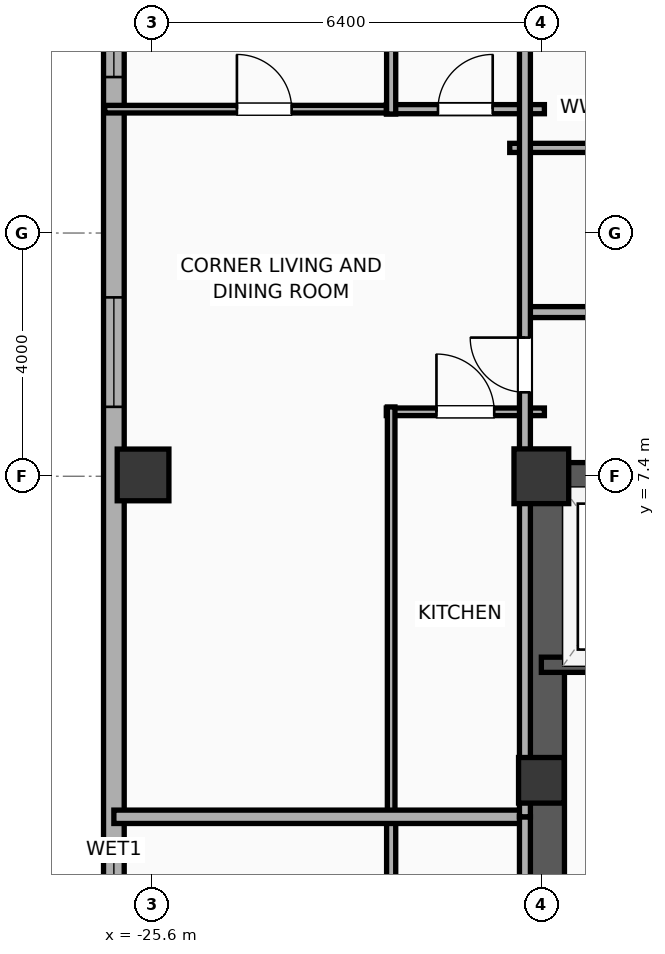
"""IFC4 building model, lengths in metres.
Left out: names, types, materials, properties, quantities, classifications, styles, units other than length and angle.
Written with IfcOpenShell. Run it as: python <this file> out.ifc"""

import sys

from ifc_helpers import new_model, si_unit, direction, frame, frame_2d, origin, origin_2d, place, context, subcontext, project, spatial, rectangle, hollow_rectangle, extrude, element, fill, save


model = new_model("IFC4")
c1 = context("Model", 3, precision=1e-05, world=origin(), true_north=direction((0.0, 1.0)))
c2 = subcontext(c1, "Body", "Model", "MODEL_VIEW")
j1 = project(units=[si_unit("LENGTHUNIT", "METRE"), si_unit("PLANEANGLEUNIT", "RADIAN")], contexts=[c1])
p1 = place(None, origin())
s1 = spatial("IfcSite", under=j1, at=p1, CompositionType="ELEMENT")
p2 = place(p1, origin())
s2 = spatial("IfcBuilding", under=s1, at=p2, CompositionType="ELEMENT")
p3 = place(p2, frame((0.0, 0.0, 200.2)))
s3 = spatial("IfcBuildingStorey", under=s2, at=p3, CompositionType="ELEMENT", Elevation=200.2)
p4 = place(p3, frame((-19.2, 2.4, 0.0), z_axis=(0.0, 0.0, 1.0), x_axis=(1.0, 0.0, 0.0)))
e1 = element("IfcColumn", 1, at=p4, inside=s3, PredefinedType="COLUMN", context=c2, shape_type="SweptSolid", body=[
    extrude(rectangle(XDim=0.75, YDim=0.75, at=origin_2d()), origin(), (0.0, 0.0, 1.0), 3.9),
])
p5 = place(p3, frame((-19.2, 7.4, 0.0), z_axis=(0.0, 0.0, 1.0), x_axis=(1.0, 0.0, 0.0)))
e2 = element("IfcColumn", 2, at=p5, inside=s3, PredefinedType="COLUMN", context=c2, shape_type="SweptSolid", body=[
    extrude(rectangle(XDim=0.9, YDim=0.9, at=origin_2d()), origin(), (0.0, 0.0, 1.0), 3.9),
])
p6 = place(p3, frame((-19.425, 7.4, 0.0), z_axis=(0.0, 0.0, 1.0), x_axis=(1.0, 0.0, 0.0)))
e3 = element("IfcWall", 3, at=p6, inside=s3, PredefinedType="SHEAR", context=c2, shape_type="SweptSolid", body=[
    extrude(rectangle(XDim=7.25, YDim=0.45, at=frame_2d((3.625, 0.0))), origin(), (0.0, 0.0, 1.0), 3.65),
])
p7 = place(p3, frame((-19.145, -7.4, 0.0), z_axis=(0.0, 0.0, 1.0), x_axis=(0.0, 1.0, 0.0)))
e4 = element("IfcWall", 4, at=p7, inside=s3, PredefinedType="SHEAR", context=c2, shape_type="SweptSolid", body=[
    extrude(rectangle(XDim=14.8, YDim=0.65, at=frame_2d((7.4, 0.0))), origin(), (0.0, 0.0, 1.0), 3.65),
])
p8 = place(p3, frame((-25.75, 7.422, 0.0), z_axis=(0.0, 0.0, 1.0), x_axis=(1.0, 0.0, 0.0)))
e5 = element("IfcColumn", 5, at=p8, inside=s3, PredefinedType="COLUMN", context=c2, shape_type="SweptSolid", body=[
    extrude(hollow_rectangle(XDim=0.85, YDim=0.85, WallThickness=0.028, at=origin_2d()), origin(), (0.0, 0.0, 1.0), 3.9),
])
p9 = place(p3, frame((-26.23, -15.383, 0.0), z_axis=(0.0, 0.0, 1.0), x_axis=(0.0, 1.0, 0.0)))
e6 = element("IfcWall", 6, at=p9, inside=s3, PredefinedType="ELEMENTEDWALL", context=c2, shape_type="SweptSolid", body=[
    extrude(rectangle(XDim=31.967, YDim=0.34, at=frame_2d((15.983, 0.0))), origin(), (0.0, 0.0, 1.0), 2.54),
])
p10 = place(p9, frame((6.242, 0.0, 0.75)))
e7 = element("IfcOpeningElement", 7, at=p10, cuts=e6, PredefinedType="OPENING", context=c2, shape_type="SweptSolid", body=[
    extrude(rectangle(XDim=1.8, YDim=1.63, at=frame_2d((0.9, 0.815))), frame((0.0, 0.18, 0.0), z_axis=(0.0, -1.0, 0.0), x_axis=(1.0, 0.0, 0.0)), (0.0, 0.0, 1.0), 0.36),
])
p11 = place(p9, frame((23.925, 0.0, 0.75)))
e8 = element("IfcOpeningElement", 8, at=p11, cuts=e6, PredefinedType="OPENING", context=c2, shape_type="SweptSolid", body=[
    extrude(rectangle(XDim=1.8, YDim=1.63, at=frame_2d((0.9, 0.815))), frame((0.0, 0.18, 0.0), z_axis=(0.0, -1.0, 0.0), x_axis=(1.0, 0.0, 0.0)), (0.0, 0.0, 1.0), 0.36),
])
p12 = place(p9, frame((13.253, 0.0, 0.75)))
e9 = element("IfcOpeningElement", 9, at=p12, cuts=e6, PredefinedType="OPENING", context=c2, shape_type="SweptSolid", body=[
    extrude(rectangle(XDim=1.2, YDim=1.63, at=frame_2d((0.6, 0.815))), frame((0.0, 0.18, 0.0), z_axis=(0.0, -1.0, 0.0), x_axis=(1.0, 0.0, 0.0)), (0.0, 0.0, 1.0), 0.36),
])
p13 = place(p9, frame((29.348, 0.0, 0.75)))
e10 = element("IfcOpeningElement", 10, at=p13, cuts=e6, PredefinedType="OPENING", context=c2, shape_type="SweptSolid", body=[
    extrude(rectangle(XDim=1.2, YDim=1.63, at=frame_2d((0.6, 0.815))), frame((0.0, 0.18, 0.0), z_axis=(0.0, -1.0, 0.0), x_axis=(1.0, 0.0, 0.0)), (0.0, 0.0, 1.0), 0.36),
])
p14 = place(p3, frame((-19.2, 4.3, 0.0), z_axis=(0.0, 0.0, 1.0), x_axis=(1.0, 0.0, 0.0)))
e11 = element("IfcWall", 11, at=p14, inside=s3, PredefinedType="SOLIDWALL", context=c2, shape_type="SweptSolid", body=[
    extrude(rectangle(XDim=2.6, YDim=0.25, at=frame_2d((1.3, 0.0))), origin(), (0.0, 0.0, 1.0), 3.65),
])
p15 = place(p3, frame((-19.72, 12.8, 0.0), z_axis=(0.0, 0.0, 1.0), x_axis=(1.0, 0.0, 0.0)))
e12 = element("IfcWall", 12, at=p15, inside=s3, PredefinedType="PLUMBINGWALL", context=c2, shape_type="SweptSolid", body=[
    extrude(rectangle(XDim=2.679, YDim=0.15, at=frame_2d((1.339, 0.0))), origin(), (0.0, 0.0, 1.0), 3.65),
])
p16 = place(p3, frame((-19.5, 10.1, 0.0), z_axis=(0.0, 0.0, 1.0), x_axis=(1.0, 0.0, 0.0)))
e13 = element("IfcWall", 13, at=p16, inside=s3, PredefinedType="PARTITIONING", context=c2, shape_type="SweptSolid", body=[
    extrude(rectangle(XDim=11.42, YDim=0.18, at=frame_2d((5.71, 0.0))), origin(), (0.0, 0.0, 1.0), 3.65),
])
p17 = place(p16, frame((3.464, 0.0, 0.0)))
e14 = element("IfcOpeningElement", 14, at=p17, cuts=e13, PredefinedType="OPENING", context=c2, shape_type="SweptSolid", body=[
    extrude(rectangle(XDim=1.15, YDim=2.05, at=frame_2d((0.575, 1.025))), frame((0.0, 0.1, 0.0), z_axis=(0.0, -1.0, 0.0), x_axis=(1.0, 0.0, 0.0)), (0.0, 0.0, 1.0), 0.2),
])
p18 = place(p16, frame((8.323, 0.0, 0.0)))
e15 = element("IfcOpeningElement", 15, at=p18, cuts=e13, PredefinedType="OPENING", context=c2, shape_type="SweptSolid", body=[
    extrude(rectangle(XDim=0.9, YDim=2.05, at=frame_2d((0.45, 1.025))), frame((0.0, 0.1, 0.0), z_axis=(0.0, -1.0, 0.0), x_axis=(1.0, 0.0, 0.0)), (0.0, 0.0, 1.0), 0.2),
])
p19 = place(p3, frame((-21.67, -4.94, 0.0), z_axis=(0.0, 0.0, 1.0), x_axis=(0.0, 1.0, 0.0)))
e16 = element("IfcWall", 16, at=p19, inside=s3, PredefinedType="PLUMBINGWALL", context=c2, shape_type="SweptSolid", body=[
    extrude(rectangle(XDim=6.72, YDim=0.15, at=frame_2d((3.36, 0.0))), origin(), (0.0, 0.0, 1.0), 3.65),
])
p20 = place(p3, frame((-26.38, 13.437, 0.0), z_axis=(0.0, 0.0, 1.0), x_axis=(1.0, 0.0, 0.0)))
e17 = element("IfcWall", 17, at=p20, inside=s3, PredefinedType="PARTITIONING", context=c2, shape_type="SweptSolid", body=[
    extrude(rectangle(XDim=4.77, YDim=0.125, at=frame_2d((2.385, 0.0))), origin(), (0.0, 0.0, 1.0), 3.65),
])
p21 = place(p20, frame((2.174, 0.0, 0.0)))
e18 = element("IfcOpeningElement", 18, at=p21, cuts=e17, PredefinedType="OPENING", context=c2, shape_type="SweptSolid", body=[
    extrude(rectangle(XDim=0.9, YDim=2.05, at=frame_2d((0.45, 1.025))), frame((0.0, 0.073, 0.0), z_axis=(0.0, -1.0, 0.0), x_axis=(1.0, 0.0, 0.0)), (0.0, 0.0, 1.0), 0.145),
])
p22 = place(p3, frame((-21.75, 8.46, 0.0), z_axis=(0.0, 0.0, 1.0), x_axis=(1.0, 0.0, 0.0)))
e19 = element("IfcWall", 19, at=p22, inside=s3, PredefinedType="PARTITIONING", context=c2, shape_type="SweptSolid", body=[
    extrude(rectangle(XDim=2.6, YDim=0.125, at=frame_2d((1.3, 0.0))), origin(), (0.0, 0.0, 1.0), 3.65),
])
p23 = place(p22, frame((0.825, 0.0, 0.0)))
e20 = element("IfcOpeningElement", 20, at=p23, cuts=e19, PredefinedType="OPENING", context=c2, shape_type="SweptSolid", body=[
    extrude(rectangle(XDim=0.95, YDim=2.05, at=frame_2d((0.475, 1.025))), frame((0.0, 0.073, 0.0), z_axis=(0.0, -1.0, 0.0), x_axis=(1.0, 0.0, 0.0)), (0.0, 0.0, 1.0), 0.145),
])
p24 = place(p3, frame((-21.75, 13.437, 0.0), z_axis=(0.0, 0.0, 1.0), x_axis=(1.0, 0.0, 0.0)))
e21 = element("IfcWall", 21, at=p24, inside=s3, PredefinedType="PLUMBINGWALL", context=c2, shape_type="SweptSolid", body=[
    extrude(rectangle(XDim=2.6, YDim=0.15, at=frame_2d((1.3, 0.0))), origin(), (0.0, 0.0, 1.0), 3.65),
])
p25 = place(p24, frame((0.85, 0.0, 0.0)))
e22 = element("IfcOpeningElement", 22, at=p25, cuts=e21, PredefinedType="OPENING", context=c2, shape_type="SweptSolid", body=[
    extrude(rectangle(XDim=0.9, YDim=2.05, at=frame_2d((0.45, 1.025))), frame((0.0, 0.085, 0.0), z_axis=(0.0, -1.0, 0.0), x_axis=(1.0, 0.0, 0.0)), (0.0, 0.0, 1.0), 0.17),
])
p26 = place(p3, frame((-21.67, 1.82, 0.0), z_axis=(0.0, 0.0, 1.0), x_axis=(0.0, 1.0, 0.0)))
e23 = element("IfcWall", 23, at=p26, inside=s3, PredefinedType="PARTITIONING", context=c2, shape_type="SweptSolid", body=[
    extrude(rectangle(XDim=6.72, YDim=0.125, at=frame_2d((3.36, 0.0))), origin(), (0.0, 0.0, 1.0), 3.65),
])
p27 = place(p3, frame((-21.67, 13.357, 0.0), z_axis=(0.0, 0.0, 1.0), x_axis=(0.0, 1.0, 0.0)))
e24 = element("IfcWall", 24, at=p27, inside=s3, PredefinedType="PLUMBINGWALL", context=c2, shape_type="SweptSolid", body=[
    extrude(rectangle(XDim=6.72, YDim=0.15, at=frame_2d((3.36, 0.0))), origin(), (0.0, 0.0, 1.0), 2.54),
])
p28 = place(p3, frame((-19.47, 1.8, 0.0), z_axis=(0.0, 0.0, 1.0), x_axis=(-1.0, 0.0, 0.0)))
e25 = element("IfcWall", 25, at=p28, inside=s3, PredefinedType="PARTITIONING", context=c2, shape_type="SweptSolid", body=[
    extrude(rectangle(XDim=6.76, YDim=0.22, at=frame_2d((3.38, 0.0))), origin(), (0.0, 0.0, 1.0), 3.65),
])
p29 = place(p3, frame((-19.47, -18.83, 0.0), z_axis=(0.0, 0.0, 1.0), x_axis=(0.0, 1.0, 0.0)))
e26 = element("IfcWall", 26, at=p29, inside=s3, PredefinedType="PARTITIONING", context=c2, shape_type="SweptSolid", body=[
    extrude(rectangle(XDim=20.63, YDim=0.18, at=frame_2d((10.315, 0.0))), origin(), (0.0, 0.0, 1.0), 2.54),
])
p30 = place(p29, frame((9.149, 0.0, 0.0)))
e27 = element("IfcOpeningElement", 27, at=p30, cuts=e26, PredefinedType="OPENING", context=c2, shape_type="SweptSolid", body=[
    extrude(rectangle(XDim=0.9, YDim=2.05, at=frame_2d((0.45, 1.025))), frame((0.0, 0.1, 0.0), z_axis=(0.0, -1.0, 0.0), x_axis=(1.0, 0.0, 0.0)), (0.0, 0.0, 1.0), 0.2),
])
p31 = place(p3, frame((-19.47, 1.8, 0.0), z_axis=(0.0, 0.0, 1.0), x_axis=(0.0, 1.0, 0.0)))
e28 = element("IfcWall", 28, at=p31, inside=s3, PredefinedType="PARTITIONING", context=c2, shape_type="SweptSolid", body=[
    extrude(rectangle(XDim=18.23, YDim=0.18, at=frame_2d((9.115, 0.0))), origin(), (0.0, 0.0, 1.0), 2.54),
])
p32 = place(p31, frame((6.98, 0.0, 0.0)))
e29 = element("IfcOpeningElement", 29, at=p32, cuts=e28, PredefinedType="OPENING", context=c2, shape_type="SweptSolid", body=[
    extrude(rectangle(XDim=0.9, YDim=2.05, at=frame_2d((0.45, 1.025))), frame((0.0, 0.1, 0.0), z_axis=(0.0, -1.0, 0.0), x_axis=(1.0, 0.0, 0.0)), (0.0, 0.0, 1.0), 0.2),
])
p33 = place(p11, origin())
e30 = element("IfcWindow", 30, at=p33, inside=s3, PartitioningType="SINGLE_PANEL", PredefinedType="WINDOW", context=c2, shape_type="SweptSolid", body=[
    extrude(rectangle(XDim=1.8, YDim=1.63, at=frame_2d((0.9, 0.815))), frame((0.0, 0.03, 0.0), z_axis=(0.0, -1.0, 0.0), x_axis=(1.0, 0.0, 0.0)), (0.0, 0.0, 1.0), 0.06),
])
fill(e8, e30)
p34 = place(p13, origin())
e31 = element("IfcWindow", 31, at=p34, inside=s3, PartitioningType="SINGLE_PANEL", PredefinedType="WINDOW", context=c2, shape_type="SweptSolid", body=[
    extrude(rectangle(XDim=1.2, YDim=1.63, at=frame_2d((0.6, 0.815))), frame((0.0, 0.03, 0.0), z_axis=(0.0, -1.0, 0.0), x_axis=(1.0, 0.0, 0.0)), (0.0, 0.0, 1.0), 0.06),
])
fill(e10, e31)
p35 = place(p21, origin())
e32 = element("IfcDoor", 32, at=p35, inside=s3, OperationType="SINGLE_SWING_LEFT", PredefinedType="DOOR", context=c2, shape_type="SweptSolid", body=[
    extrude(rectangle(XDim=0.9, YDim=2.05, at=frame_2d((0.45, 1.025))), frame((0.0, 0.025, 0.0), z_axis=(0.0, -1.0, 0.0), x_axis=(1.0, 0.0, 0.0)), (0.0, 0.0, 1.0), 0.05),
])
fill(e18, e32)
p36 = place(p23, origin())
e33 = element("IfcDoor", 33, at=p36, inside=s3, OperationType="SINGLE_SWING_LEFT", PredefinedType="DOOR", context=c2, shape_type="SweptSolid", body=[
    extrude(rectangle(XDim=0.95, YDim=2.05, at=frame_2d((0.475, 1.025))), frame((0.0, 0.025, 0.0), z_axis=(0.0, -1.0, 0.0), x_axis=(1.0, 0.0, 0.0)), (0.0, 0.0, 1.0), 0.05),
])
fill(e20, e33)
p37 = place(p25, origin())
e34 = element("IfcDoor", 34, at=p37, inside=s3, OperationType="SINGLE_SWING_RIGHT", PredefinedType="DOOR", context=c2, shape_type="SweptSolid", body=[
    extrude(rectangle(XDim=0.9, YDim=2.05, at=frame_2d((0.45, 1.025))), frame((0.0, 0.025, 0.0), z_axis=(0.0, -1.0, 0.0), x_axis=(1.0, 0.0, 0.0)), (0.0, 0.0, 1.0), 0.05),
])
fill(e22, e34)
p38 = place(p32, origin())
e35 = element("IfcDoor", 35, at=p38, inside=s3, OperationType="SINGLE_SWING_RIGHT", PredefinedType="DOOR", context=c2, shape_type="SweptSolid", body=[
    extrude(rectangle(XDim=0.9, YDim=2.05, at=frame_2d((0.45, 1.025))), frame((0.0, 0.025, 0.0), z_axis=(0.0, -1.0, 0.0), x_axis=(1.0, 0.0, 0.0)), (0.0, 0.0, 1.0), 0.05),
])
fill(e29, e35)
save(model, sys.argv[1])
